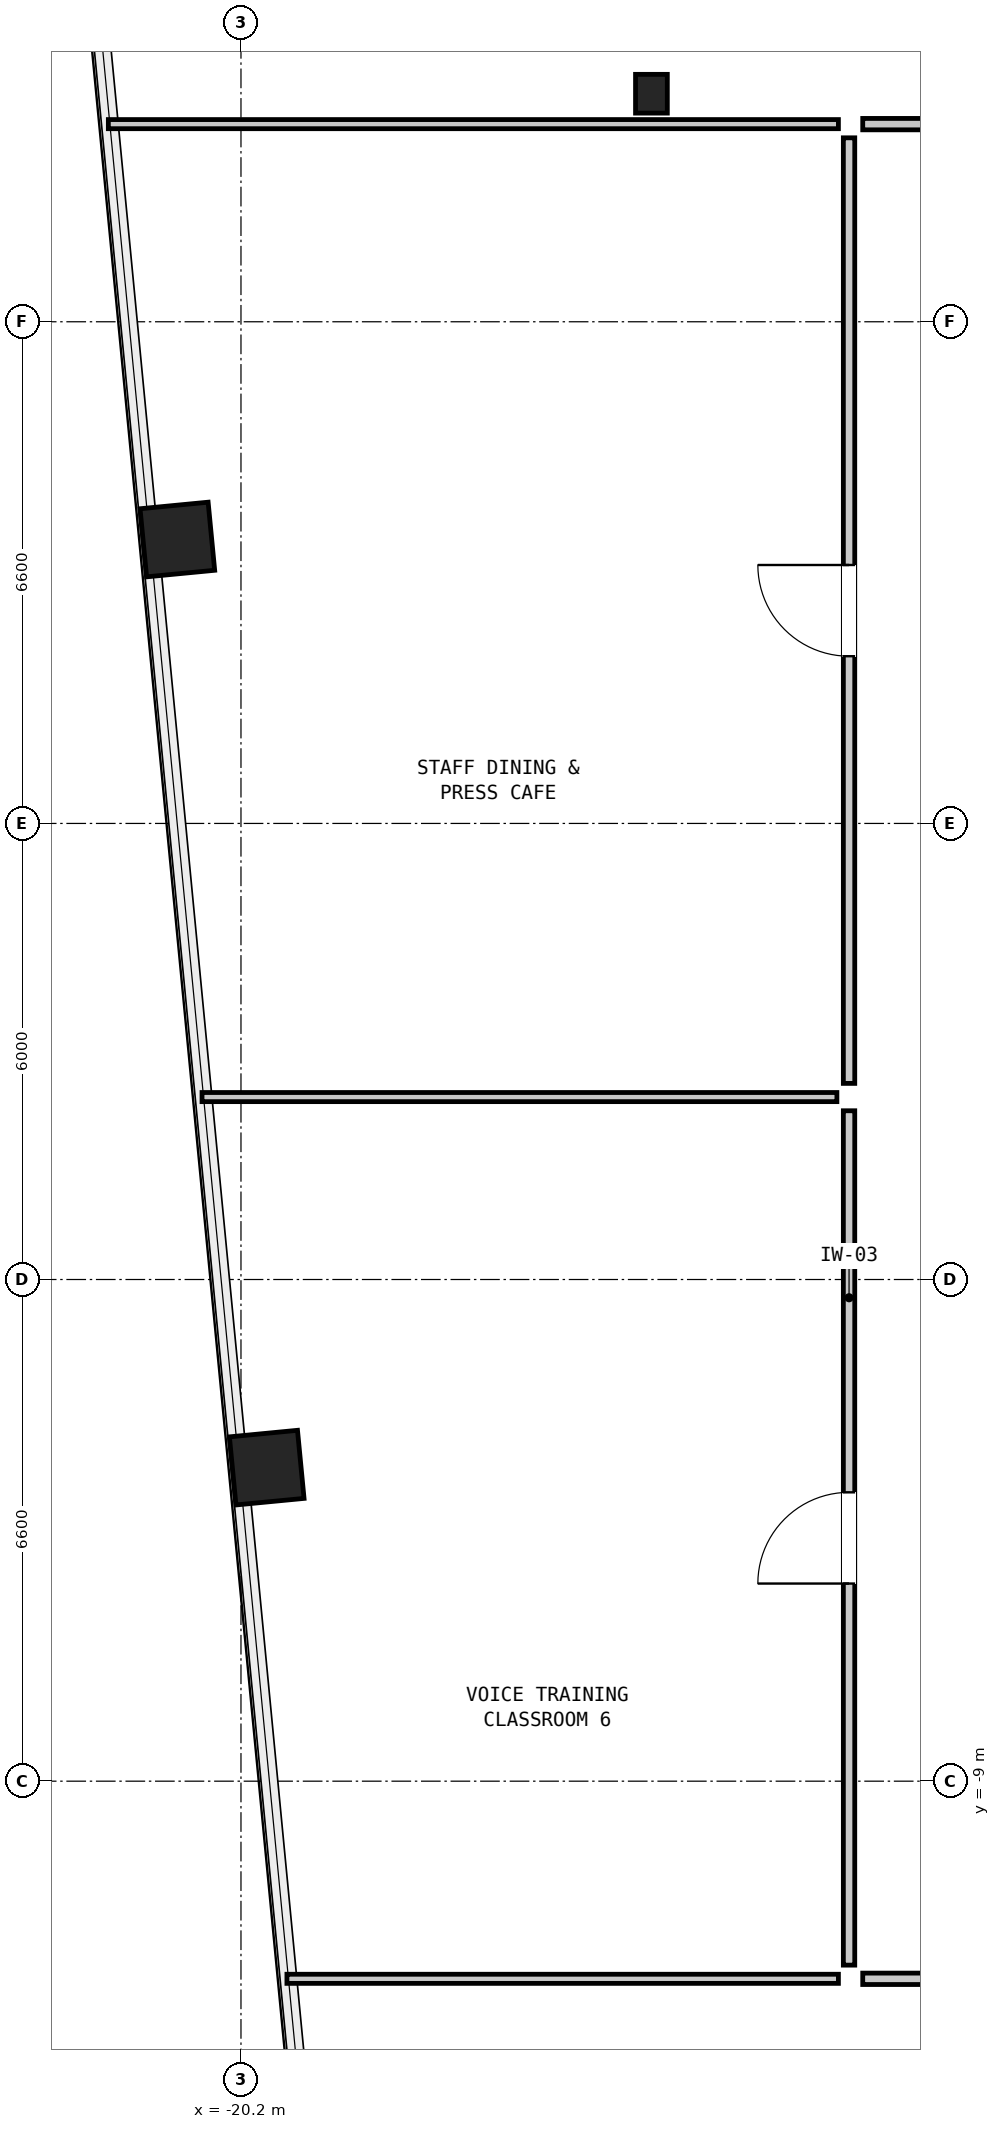
"""IFC4 building model, lengths in metres.
Left out: names, types, materials, properties, quantities, classifications, styles, units other than length and angle.
Written with IfcOpenShell. Run it as: python <this file> out.ifc"""

import sys

from ifc_helpers import new_model, si_unit, direction, frame, frame_2d, origin, origin_2d, place, context, subcontext, project, spatial, rectangle, hollow_rectangle, i_section, extrude, element, fill, save


model = new_model("IFC4")
c1 = context("Model", 3, precision=1e-05, world=origin(), true_north=direction((0.0, 1.0)))
c2 = subcontext(c1, "Body", "Model", "MODEL_VIEW")
j1 = project(units=[si_unit("LENGTHUNIT", "METRE"), si_unit("PLANEANGLEUNIT", "RADIAN")], contexts=[c1])
p1 = place(None, origin())
s1 = spatial("IfcSite", under=j1, at=p1, CompositionType="ELEMENT")
p2 = place(p1, origin())
s2 = spatial("IfcBuilding", under=s1, at=p2, CompositionType="ELEMENT")
p3 = place(p2, frame((0.0, 0.0, 96.9)))
s3 = spatial("IfcBuildingStorey", under=s2, at=p3, CompositionType="ELEMENT", Elevation=96.9)
for number, where, z_axis, x_axis in (
    (1, (-21.037, 7.335, 0.0), (0.0, 0.0, 1.0), (-0.096, 0.995, 0.0)),
    (2, (-19.861, -4.875, 0.0), (0.0, 0.0, 1.0), (-0.096, 0.995, 0.0)),
):
    element("IfcColumn", number, at=place(p3, frame(where, z_axis=z_axis, x_axis=x_axis)), inside=s3, PredefinedType="COLUMN", context=c2, shape_type="SweptSolid", body=[
        extrude(hollow_rectangle(XDim=0.9, YDim=0.9, WallThickness=0.055, at=origin_2d()), origin(), (0.0, 0.0, 1.0), 4.35),
    ])
p4 = place(p3, frame((-14.8, 13.2, 0.0), z_axis=(0.0, 0.0, 1.0), x_axis=(1.0, 0.0, 0.0)))
e3 = element("IfcColumn", 3, at=p4, inside=s3, PredefinedType="COLUMN", context=c2, shape_type="SweptSolid", body=[
    extrude(i_section(OverallWidth=0.418, OverallDepth=0.51, WebThickness=0.042, FlangeThickness=0.068, at=origin_2d()), origin(), (0.0, 0.0, 1.0), 4.35),
])
p5 = place(p3, frame((-21.945, 12.8, 0.0), z_axis=(0.0, 0.0, 1.0), x_axis=(1.0, 0.0, 0.0)))
e4 = element("IfcWall", 4, at=p5, inside=s3, PredefinedType="PARTITIONING", context=c2, shape_type="SweptSolid", body=[
    extrude(rectangle(XDim=9.605, YDim=0.12, at=frame_2d((4.802, 0.0))), origin(), (0.0, 0.0, 1.0), 4.07),
])
p6 = place(p3, frame((-19.595, -11.6, 0.0), z_axis=(0.0, 0.0, 1.0), x_axis=(1.0, 0.0, 0.0)))
e5 = element("IfcWall", 5, at=p6, inside=s3, PredefinedType="PARTITIONING", context=c2, shape_type="SweptSolid", body=[
    extrude(rectangle(XDim=7.255, YDim=0.12, at=frame_2d((3.628, 0.0))), origin(), (0.0, 0.0, 1.0), 3.288),
])
p7 = place(p3, frame((-20.712, 0.0, 0.0), z_axis=(0.0, 0.0, 1.0), x_axis=(1.0, 0.0, 0.0)))
e6 = element("IfcWall", 6, at=p7, inside=s3, PredefinedType="PARTITIONING", context=c2, shape_type="SweptSolid", body=[
    extrude(rectangle(XDim=8.352, YDim=0.12, at=frame_2d((4.176, 0.0))), origin(), (0.0, 0.0, 1.0), 4.07),
])
p8 = place(p3, frame((-12.02, 12.8, 0.0), z_axis=(0.0, 0.0, 1.0), x_axis=(1.0, 0.0, 0.0)))
e7 = element("IfcWall", 7, at=p8, inside=s3, PredefinedType="PARTITIONING", context=c2, shape_type="SweptSolid", body=[
    extrude(rectangle(XDim=6.44, YDim=0.15, at=frame_2d((3.22, 0.0))), origin(), (0.0, 0.0, 1.0), 4.07),
])
p9 = place(p8, frame((2.62, 0.0, 0.0)))
e8 = element("IfcOpeningElement", 8, at=p9, cuts=e7, PredefinedType="OPENING", context=c2, shape_type="SweptSolid", body=[
    extrude(rectangle(XDim=1.2, YDim=2.1, at=frame_2d((0.6, 1.05))), frame((0.0, 0.087, 0.0), z_axis=(0.0, -1.0, 0.0), x_axis=(1.0, 0.0, 0.0)), (0.0, 0.0, 1.0), 0.174),
])
p10 = place(p3, frame((-12.02, -11.6, 0.0), z_axis=(0.0, 0.0, 1.0), x_axis=(1.0, 0.0, 0.0)))
e9 = element("IfcWall", 9, at=p10, inside=s3, PredefinedType="PARTITIONING", context=c2, shape_type="SweptSolid", body=[
    extrude(rectangle(XDim=11.84, YDim=0.15, at=frame_2d((5.92, 0.0))), origin(), (0.0, 0.0, 1.0), 3.288),
])
p11 = place(p10, frame((5.32, 0.0, 0.0)))
e10 = element("IfcOpeningElement", 10, at=p11, cuts=e9, PredefinedType="OPENING", context=c2, shape_type="SweptSolid", body=[
    extrude(rectangle(XDim=1.2, YDim=2.1, at=frame_2d((0.6, 1.05))), frame((0.0, 0.087, 0.0), z_axis=(0.0, -1.0, 0.0), x_axis=(1.0, 0.0, 0.0)), (0.0, 0.0, 1.0), 0.174),
])
p12 = place(p3, frame((-12.2, -11.42, 0.0), z_axis=(0.0, 0.0, 1.0), x_axis=(0.0, 1.0, 0.0)))
e11 = element("IfcWall", 11, at=p12, inside=s3, PredefinedType="PARTITIONING", context=c2, shape_type="SweptSolid", body=[
    extrude(rectangle(XDim=11.24, YDim=0.15, at=frame_2d((5.62, 0.0))), origin(), (0.0, 0.0, 1.0), 2.25),
])
p13 = place(p12, frame((5.02, 0.0, 0.0)))
e12 = element("IfcOpeningElement", 12, at=p13, cuts=e11, PredefinedType="OPENING", context=c2, shape_type="SweptSolid", body=[
    extrude(rectangle(XDim=1.2, YDim=2.1, at=frame_2d((0.6, 1.05))), frame((0.0, 0.087, 0.0), z_axis=(0.0, -1.0, 0.0), x_axis=(1.0, 0.0, 0.0)), (0.0, 0.0, 1.0), 0.174),
])
p14 = place(p3, frame((-12.2, 0.18, 0.0), z_axis=(0.0, 0.0, 1.0), x_axis=(0.0, 1.0, 0.0)))
e13 = element("IfcWall", 13, at=p14, inside=s3, PredefinedType="PARTITIONING", context=c2, shape_type="SweptSolid", body=[
    extrude(rectangle(XDim=12.44, YDim=0.15, at=frame_2d((6.22, 0.0))), origin(), (0.0, 0.0, 1.0), 2.25),
])
p15 = place(p14, frame((5.62, 0.0, 0.0)))
e14 = element("IfcOpeningElement", 14, at=p15, cuts=e13, PredefinedType="OPENING", context=c2, shape_type="SweptSolid", body=[
    extrude(rectangle(XDim=1.2, YDim=2.1, at=frame_2d((0.6, 1.05))), frame((0.0, 0.087, 0.0), z_axis=(0.0, -1.0, 0.0), x_axis=(1.0, 0.0, 0.0)), (0.0, 0.0, 1.0), 0.174),
])
p16 = place(p13, origin())
e15 = element("IfcDoor", 15, at=p16, inside=s3, OperationType="SINGLE_SWING_LEFT", PredefinedType="DOOR", context=c2, shape_type="SweptSolid", body=[
    extrude(rectangle(XDim=1.2, YDim=2.1, at=frame_2d((0.6, 1.05))), frame((0.0, 0.025, 0.0), z_axis=(0.0, -1.0, 0.0), x_axis=(1.0, 0.0, 0.0)), (0.0, 0.0, 1.0), 0.05),
])
fill(e12, e15)
p17 = place(p15, origin())
e16 = element("IfcDoor", 16, at=p17, inside=s3, OperationType="SINGLE_SWING_RIGHT", PredefinedType="DOOR", context=c2, shape_type="SweptSolid", body=[
    extrude(rectangle(XDim=1.2, YDim=2.1, at=frame_2d((0.6, 1.05))), frame((0.0, 0.025, 0.0), z_axis=(0.0, -1.0, 0.0), x_axis=(1.0, 0.0, 0.0)), (0.0, 0.0, 1.0), 0.05),
])
fill(e14, e16)
save(model, sys.argv[1])
